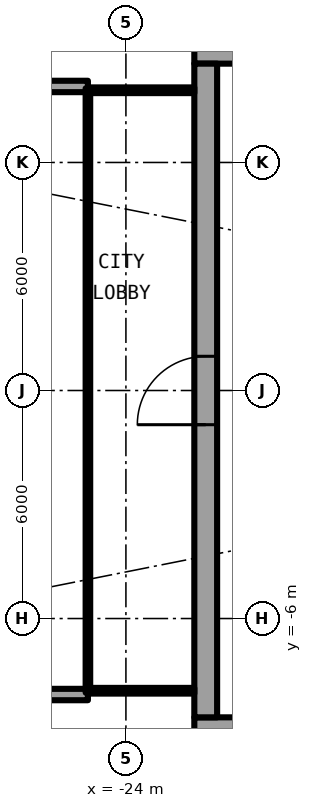
"""IFC4 building model, lengths in metres.
Left out: names, types, materials, properties, quantities, classifications, styles, units other than length and angle.
Written with IfcOpenShell. Run it as: python <this file> out.ifc"""

import sys

from ifc_helpers import new_model, si_unit, direction, frame, frame_2d, origin, place, context, subcontext, project, spatial, rectangle, extrude, element, fill, save


model = new_model("IFC4")
c1 = context("Model", 3, precision=1e-05, world=origin(), true_north=direction((0.0, 1.0)))
c2 = subcontext(c1, "Body", "Model", "MODEL_VIEW")
j1 = project(units=[si_unit("LENGTHUNIT", "METRE"), si_unit("PLANEANGLEUNIT", "RADIAN")], contexts=[c1])
p1 = place(None, origin())
s1 = spatial("IfcSite", under=j1, at=p1, CompositionType="ELEMENT")
p2 = place(p1, origin())
s2 = spatial("IfcBuilding", under=s1, at=p2, CompositionType="ELEMENT")
p3 = place(p2, frame((0.0, 0.0, 129.95)))
s3 = spatial("IfcBuildingStorey", under=s2, at=p3, CompositionType="ELEMENT", Elevation=129.95)
for number, where, z_axis, x_axis in (
    (1, (-25.0, 8.0, 0.0), (0.0, 0.0, 1.0), (-1.0, 0.0, 0.0)),
    (2, (-25.0, -8.0, 0.0), (0.0, 0.0, 1.0), (-1.0, 0.0, 0.0)),
):
    element("IfcWall", number, at=place(p3, frame(where, z_axis=z_axis, x_axis=x_axis)), inside=s3, PredefinedType="SOLIDWALL", context=c2, shape_type="SweptSolid", body=[
        extrude(rectangle(XDim=2.667, YDim=0.3, at=frame_2d((1.333, 0.0))), origin(), (0.0, 0.0, 1.0), 2.7),
    ])
p4 = place(p3, frame((-22.2, -8.9, 0.0), z_axis=(0.0, 0.0, 1.0), x_axis=(1.0, 0.0, 0.0)))
e3 = element("IfcWall", 3, at=p4, inside=s3, PredefinedType="SHEAR", context=c2, shape_type="SweptSolid", body=[
    extrude(rectangle(XDim=13.8, YDim=0.6, at=frame_2d((6.9, 0.0))), origin(), (0.0, 0.0, 1.0), 3.05),
])
p5 = place(p4, frame((1.125, 0.0, 0.0)))
e4 = element("IfcOpeningElement", 4, at=p5, cuts=e3, PredefinedType="OPENING", context=c2, shape_type="SweptSolid", body=[
    extrude(rectangle(XDim=1.2, YDim=2.3, at=frame_2d((0.6, 1.15))), frame((0.0, 0.31, 0.0), z_axis=(0.0, -1.0, 0.0), x_axis=(1.0, 0.0, 0.0)), (0.0, 0.0, 1.0), 0.62),
])
p6 = place(p3, frame((-8.4, 8.9, 0.0), z_axis=(0.0, 0.0, 1.0), x_axis=(-1.0, 0.0, 0.0)))
e5 = element("IfcWall", 5, at=p6, inside=s3, PredefinedType="SHEAR", context=c2, shape_type="SweptSolid", body=[
    extrude(rectangle(XDim=13.8, YDim=0.6, at=frame_2d((6.9, 0.0))), origin(), (0.0, 0.0, 1.0), 3.05),
])
p7 = place(p6, frame((11.475, 0.0, 0.0)))
e6 = element("IfcOpeningElement", 6, at=p7, cuts=e5, PredefinedType="OPENING", context=c2, shape_type="SweptSolid", body=[
    extrude(rectangle(XDim=1.2, YDim=2.3, at=frame_2d((0.6, 1.15))), frame((0.0, 0.31, 0.0), z_axis=(0.0, -1.0, 0.0), x_axis=(1.0, 0.0, 0.0)), (0.0, 0.0, 1.0), 0.62),
])
p8 = place(p3, frame((-21.9, -8.6, 0.0), z_axis=(0.0, 0.0, 1.0), x_axis=(0.0, 1.0, 0.0)))
e7 = element("IfcWall", 7, at=p8, inside=s3, PredefinedType="SHEAR", context=c2, shape_type="SweptSolid", body=[
    extrude(rectangle(XDim=17.2, YDim=0.6, at=frame_2d((8.6, 0.0))), origin(), (0.0, 0.0, 1.0), 3.05),
])
p9 = place(p8, frame((7.7, 0.0, 0.0)))
e8 = element("IfcOpeningElement", 8, at=p9, cuts=e7, PredefinedType="OPENING", context=c2, shape_type="SweptSolid", body=[
    extrude(rectangle(XDim=1.8, YDim=2.3, at=frame_2d((0.9, 1.15))), frame((0.0, 0.31, 0.0), z_axis=(0.0, -1.0, 0.0), x_axis=(1.0, 0.0, 0.0)), (0.0, 0.0, 1.0), 0.62),
])
for number, where, z_axis, x_axis in (
    (9, (-22.2, 7.9, 0.0), (0.0, 0.0, 1.0), (-1.0, 0.0, 0.0)),
    (10, (-22.2, -7.9, 0.0), (0.0, 0.0, 1.0), (-1.0, 0.0, 0.0)),
):
    element("IfcWall", number, at=place(p3, frame(where, z_axis=z_axis, x_axis=x_axis)), inside=s3, PredefinedType="PARTITIONING", context=c2, shape_type="SweptSolid", body=[
        extrude(rectangle(XDim=2.74, YDim=0.15, at=frame_2d((1.37, 0.0))), origin(), (0.0, 0.0, 1.0), 2.7),
    ])
p10 = place(p3, frame((-25.0, 7.95, 0.0), z_axis=(0.0, 0.0, 1.0), x_axis=(0.0, -1.0, 0.0)))
e11 = element("IfcWall", 11, at=p10, inside=s3, PredefinedType="PARTITIONING", context=c2, shape_type="SweptSolid", body=[
    extrude(rectangle(XDim=15.9, YDim=0.12, at=frame_2d((7.95, 0.0))), origin(), (0.0, 0.0, 1.0), 2.7),
])
p11 = place(p10, frame((0.95, 0.0, 0.1)))
e12 = element("IfcOpeningElement", 12, at=p11, cuts=e11, PredefinedType="OPENING", context=c2, shape_type="SweptSolid", body=[
    extrude(rectangle(XDim=14.0, YDim=2.35, at=frame_2d((7.0, 1.175))), frame((0.0, 0.07, 0.0), z_axis=(0.0, -1.0, 0.0), x_axis=(1.0, 0.0, 0.0)), (0.0, 0.0, 1.0), 0.14),
])
p12 = place(p9, origin())
e13 = element("IfcDoor", 13, at=p12, inside=s3, OperationType="SINGLE_SWING_LEFT", PredefinedType="DOOR", context=c2, shape_type="SweptSolid", body=[
    extrude(rectangle(XDim=1.8, YDim=2.3, at=frame_2d((0.9, 1.15))), frame((0.0, 0.025, 0.0), z_axis=(0.0, -1.0, 0.0), x_axis=(1.0, 0.0, 0.0)), (0.0, 0.0, 1.0), 0.05),
])
fill(e8, e13)
p13 = place(p11, origin())
e14 = element("IfcWindow", 14, at=p13, inside=s3, PartitioningType="SINGLE_PANEL", PredefinedType="WINDOW", context=c2, shape_type="SweptSolid", body=[
    extrude(rectangle(XDim=14.0, YDim=2.35, at=frame_2d((7.0, 1.175))), frame((0.0, 0.03, 0.0), z_axis=(0.0, -1.0, 0.0), x_axis=(1.0, 0.0, 0.0)), (0.0, 0.0, 1.0), 0.06),
])
fill(e12, e14)
save(model, sys.argv[1])
